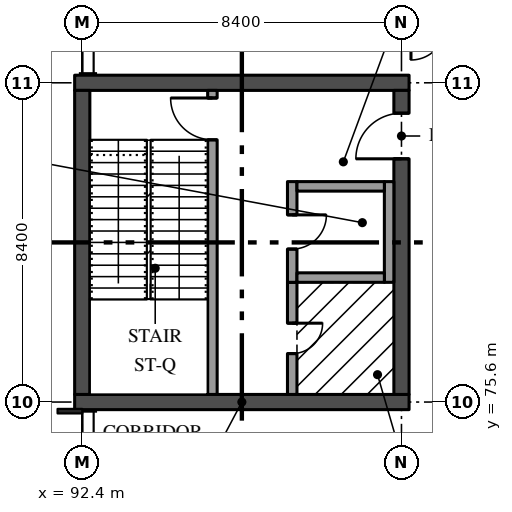
"""IFC4 building model, lengths in metres.
Left out: names, types, materials, properties, quantities, classifications, styles, units other than length and angle.
Written with IfcOpenShell. Run it as: python <this file> out.ifc"""

import sys

from ifc_helpers import new_model, si_unit, direction, frame, frame_2d, origin, place, context, subcontext, project, spatial, rectangle, extrude, element, fill, save


model = new_model("IFC4")
c1 = context("Model", 3, precision=1e-05, world=origin(), true_north=direction((0.0, 1.0)))
c2 = subcontext(c1, "Body", "Model", "MODEL_VIEW")
j1 = project(units=[si_unit("LENGTHUNIT", "METRE"), si_unit("PLANEANGLEUNIT", "RADIAN")], contexts=[c1])
p1 = place(None, origin())
s1 = spatial("IfcSite", under=j1, at=p1, CompositionType="ELEMENT")
p2 = place(p1, origin())
s2 = spatial("IfcBuilding", under=s1, at=p2, CompositionType="ELEMENT")
p3 = place(p2, frame((0.0, 0.0, 9.9)))
s3 = spatial("IfcBuildingStorey", under=s2, at=p3, CompositionType="ELEMENT", Elevation=9.9)
for number, where, z_axis, x_axis in (
    (1, (92.2, 75.6, 0.0), (0.0, 0.0, 1.0), (1.0, 0.0, 0.0)),
    (2, (92.2, 84.0, 0.0), (0.0, 0.0, 1.0), (1.0, 0.0, 0.0)),
):
    element("IfcWall", number, at=place(p3, frame(where, z_axis=z_axis, x_axis=x_axis)), inside=s3, PredefinedType="SHEAR", context=c2, shape_type="SweptSolid", body=[
        extrude(rectangle(XDim=8.8, YDim=0.4, at=frame_2d((4.4, 0.0))), origin(), (0.0, 0.0, 1.0), 4.37),
    ])
p4 = place(p3, frame((92.4, 75.8, 0.0), z_axis=(0.0, 0.0, 1.0), x_axis=(0.0, 1.0, 0.0)))
e3 = element("IfcWall", 3, at=p4, inside=s3, PredefinedType="SHEAR", context=c2, shape_type="SweptSolid", body=[
    extrude(rectangle(XDim=8.0, YDim=0.4, at=frame_2d((4.0, 0.0))), origin(), (0.0, 0.0, 1.0), 4.37),
])
p5 = place(p3, frame((100.8, 75.8, 0.0), z_axis=(0.0, 0.0, 1.0), x_axis=(0.0, 1.0, 0.0)))
e4 = element("IfcWall", 4, at=p5, inside=s3, PredefinedType="SHEAR", context=c2, shape_type="SweptSolid", body=[
    extrude(rectangle(XDim=8.0, YDim=0.4, at=frame_2d((4.0, 0.0))), origin(), (0.0, 0.0, 1.0), 4.37),
])
p6 = place(p5, frame((6.2, 0.0, 0.0)))
e5 = element("IfcOpeningElement", 5, at=p6, cuts=e4, PredefinedType="OPENING", context=c2, shape_type="SweptSolid", body=[
    extrude(rectangle(XDim=1.2, YDim=2.1, at=frame_2d((0.6, 1.05))), frame((0.0, 0.21, 0.0), z_axis=(0.0, -1.0, 0.0), x_axis=(1.0, 0.0, 0.0)), (0.0, 0.0, 1.0), 0.42),
])
p7 = place(p3, frame((95.825, 83.8, 0.0), z_axis=(0.0, 0.0, 1.0), x_axis=(0.0, -1.0, 0.0)))
e6 = element("IfcWall", 6, at=p7, inside=s3, PredefinedType="SOLIDWALL", context=c2, shape_type="SweptSolid", body=[
    extrude(rectangle(XDim=8.0, YDim=0.25, at=frame_2d((4.0, 0.0))), origin(), (0.0, 0.0, 1.0), 4.37),
])
p8 = place(p7, frame((0.2, 0.0, 0.0)))
e7 = element("IfcOpeningElement", 7, at=p8, cuts=e6, PredefinedType="OPENING", context=c2, shape_type="SweptSolid", body=[
    extrude(rectangle(XDim=1.1, YDim=2.1, at=frame_2d((0.55, 1.05))), frame((0.0, 0.135, 0.0), z_axis=(0.0, -1.0, 0.0), x_axis=(1.0, 0.0, 0.0)), (0.0, 0.0, 1.0), 0.27),
])
p9 = place(p3, frame((97.925, 78.75, 0.0), z_axis=(0.0, 0.0, 1.0), x_axis=(0.0, -1.0, 0.0)))
e8 = element("IfcWall", 8, at=p9, inside=s3, PredefinedType="SOLIDWALL", context=c2, shape_type="SweptSolid", body=[
    extrude(rectangle(XDim=2.95, YDim=0.25, at=frame_2d((1.475, 0.0))), origin(), (0.0, 0.0, 1.0), 4.37),
])
p10 = place(p9, frame((1.075, 0.0, 0.0)))
e9 = element("IfcOpeningElement", 9, at=p10, cuts=e8, PredefinedType="OPENING", context=c2, shape_type="SweptSolid", body=[
    extrude(rectangle(XDim=0.8, YDim=2.1, at=frame_2d((0.4, 1.05))), frame((0.0, 0.135, 0.0), z_axis=(0.0, -1.0, 0.0), x_axis=(1.0, 0.0, 0.0)), (0.0, 0.0, 1.0), 0.27),
])
p11 = place(p3, frame((97.925, 81.4, 0.0), z_axis=(0.0, 0.0, 1.0), x_axis=(0.0, -1.0, 0.0)))
e10 = element("IfcWall", 10, at=p11, inside=s3, PredefinedType="SOLIDWALL", context=c2, shape_type="SweptSolid", body=[
    extrude(rectangle(XDim=2.65, YDim=0.25, at=frame_2d((1.325, 0.0))), origin(), (0.0, 0.0, 1.0), 4.37),
])
p12 = place(p11, frame((0.875, 0.0, 0.0)))
e11 = element("IfcOpeningElement", 11, at=p12, cuts=e10, PredefinedType="OPENING", context=c2, shape_type="SweptSolid", body=[
    extrude(rectangle(XDim=0.9, YDim=2.1, at=frame_2d((0.45, 1.05))), frame((0.0, 0.135, 0.0), z_axis=(0.0, -1.0, 0.0), x_axis=(1.0, 0.0, 0.0)), (0.0, 0.0, 1.0), 0.27),
])
p13 = place(p3, frame((100.475, 81.4, 0.0), z_axis=(0.0, 0.0, 1.0), x_axis=(0.0, -1.0, 0.0)))
e12 = element("IfcWall", 12, at=p13, inside=s3, PredefinedType="SOLIDWALL", context=c2, shape_type="SweptSolid", body=[
    extrude(rectangle(XDim=2.65, YDim=0.25, at=frame_2d((1.325, 0.0))), origin(), (0.0, 0.0, 1.0), 4.37),
])
for number, where, z_axis, x_axis in (
    (13, (98.05, 81.275, 0.0), (0.0, 0.0, 1.0), (1.0, 0.0, 0.0)),
    (14, (98.05, 78.875, 0.0), (0.0, 0.0, 1.0), (1.0, 0.0, 0.0)),
):
    element("IfcWall", number, at=place(p3, frame(where, z_axis=z_axis, x_axis=x_axis)), inside=s3, PredefinedType="SOLIDWALL", context=c2, shape_type="SweptSolid", body=[
        extrude(rectangle(XDim=2.3, YDim=0.25, at=frame_2d((1.15, 0.0))), origin(), (0.0, 0.0, 1.0), 4.37),
    ])
p14 = place(p6, origin())
e15 = element("IfcDoor", 15, at=p14, inside=s3, OperationType="SINGLE_SWING_RIGHT", PredefinedType="DOOR", context=c2, shape_type="SweptSolid", body=[
    extrude(rectangle(XDim=1.2, YDim=2.1, at=frame_2d((0.6, 1.05))), frame((0.0, 0.035, 0.0), z_axis=(0.0, -1.0, 0.0), x_axis=(1.0, 0.0, 0.0)), (0.0, 0.0, 1.0), 0.07),
])
fill(e5, e15)
p15 = place(p12, origin())
e16 = element("IfcDoor", 16, at=p15, inside=s3, OperationType="SINGLE_SWING_RIGHT", PredefinedType="DOOR", context=c2, shape_type="SweptSolid", body=[
    extrude(rectangle(XDim=0.9, YDim=2.1, at=frame_2d((0.45, 1.05))), frame((0.0, 0.035, 0.0), z_axis=(0.0, -1.0, 0.0), x_axis=(1.0, 0.0, 0.0)), (0.0, 0.0, 1.0), 0.07),
])
fill(e11, e16)
p16 = place(p10, origin())
e17 = element("IfcDoor", 17, at=p16, inside=s3, OperationType="SINGLE_SWING_RIGHT", PredefinedType="DOOR", context=c2, shape_type="SweptSolid", body=[
    extrude(rectangle(XDim=0.8, YDim=2.1, at=frame_2d((0.4, 1.05))), frame((0.0, 0.035, 0.0), z_axis=(0.0, -1.0, 0.0), x_axis=(1.0, 0.0, 0.0)), (0.0, 0.0, 1.0), 0.07),
])
fill(e9, e17)
p17 = place(p8, frame((1.1, 0.0, 0.0), z_axis=(0.0, 0.0, 1.0), x_axis=(-1.0, 0.0, 0.0)))
e18 = element("IfcDoor", 18, at=p17, inside=s3, OperationType="SINGLE_SWING_LEFT", PredefinedType="DOOR", context=c2, shape_type="SweptSolid", body=[
    extrude(rectangle(XDim=1.1, YDim=2.1, at=frame_2d((0.55, 1.05))), frame((0.0, 0.035, 0.0), z_axis=(0.0, -1.0, 0.0), x_axis=(1.0, 0.0, 0.0)), (0.0, 0.0, 1.0), 0.07),
])
fill(e7, e18)
save(model, sys.argv[1])
